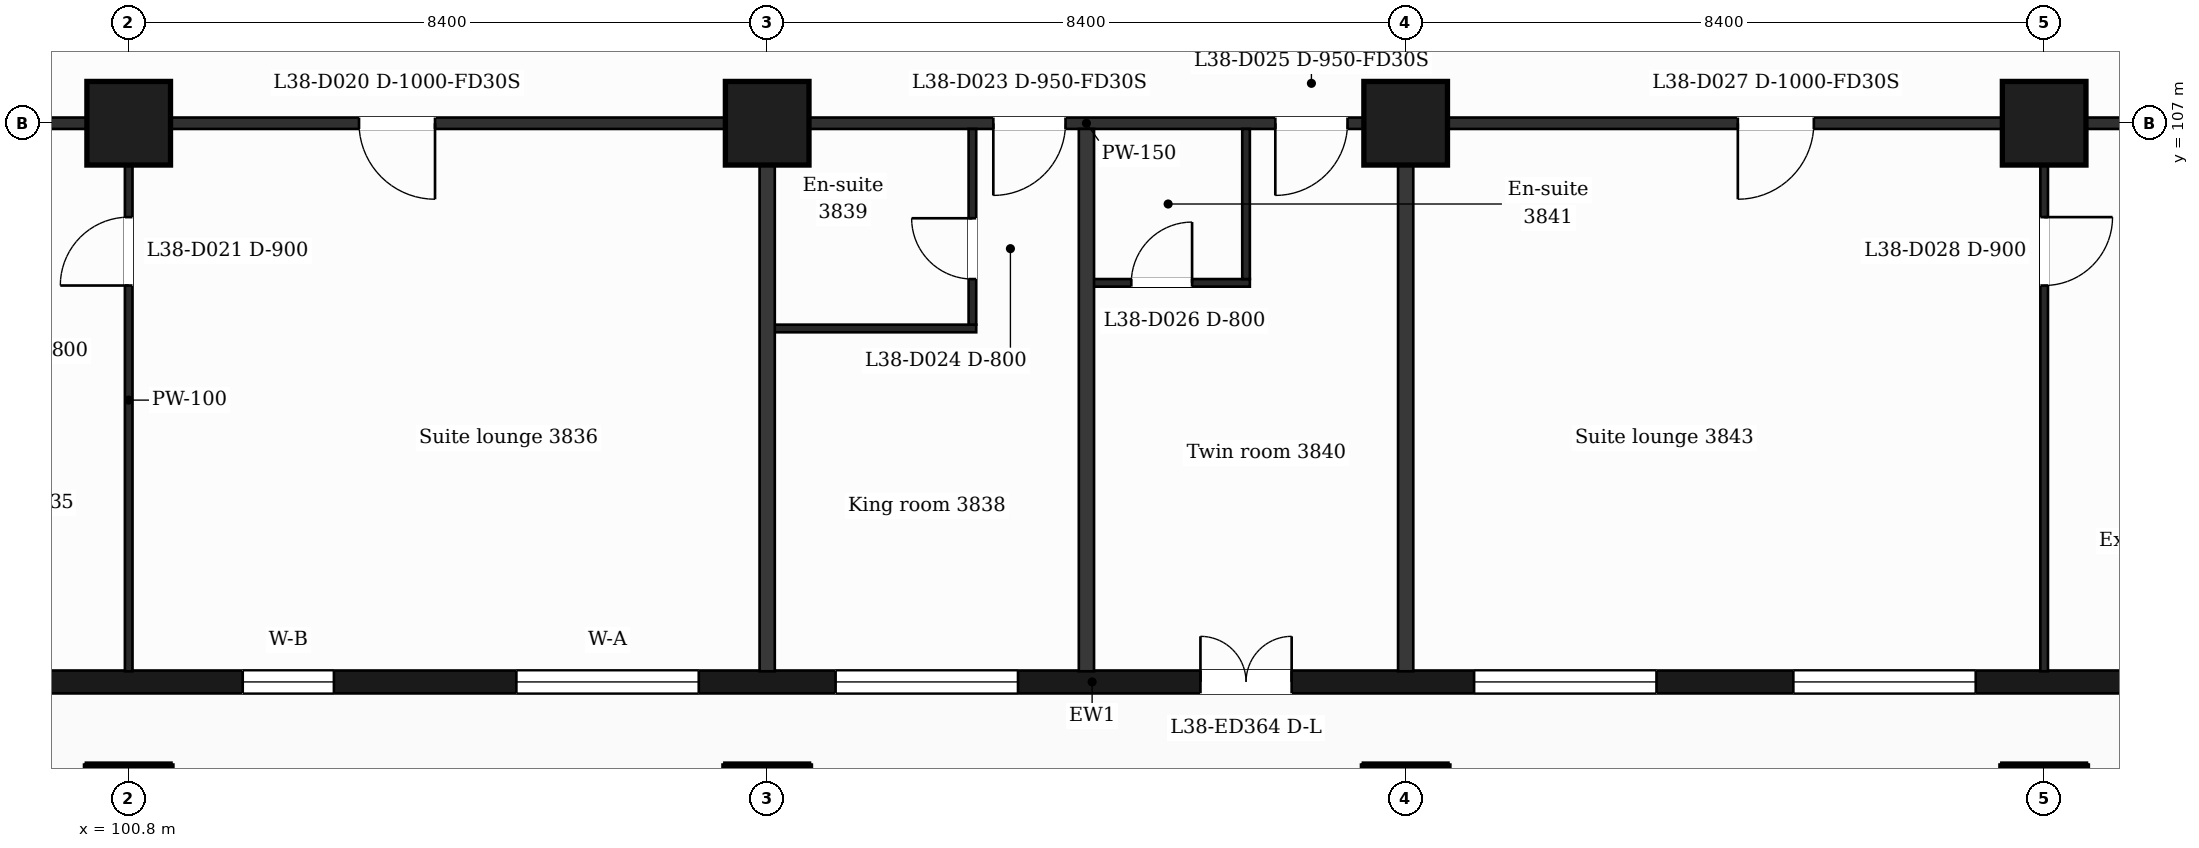
"""IFC4 building model, lengths in metres.
Left out: names, types, materials, properties, quantities, classifications, styles, units other than length and angle.
Written with IfcOpenShell. Run it as: python <this file> out.ifc"""

import sys

from ifc_helpers import new_model, si_unit, direction, frame, frame_2d, origin, origin_2d, place, context, subcontext, project, spatial, rectangle, extrude, element, fill, save


model = new_model("IFC4")
c1 = context("Model", 3, precision=1e-05, world=origin(), true_north=direction((0.0, 1.0)))
c2 = subcontext(c1, "Body", "Model", "MODEL_VIEW")
j1 = project(units=[si_unit("LENGTHUNIT", "METRE"), si_unit("PLANEANGLEUNIT", "RADIAN")], contexts=[c1])
p1 = place(None, origin())
s1 = spatial("IfcSite", under=j1, at=p1, CompositionType="ELEMENT")
p2 = place(p1, origin())
s2 = spatial("IfcBuilding", under=s1, at=p2, CompositionType="ELEMENT")
p3 = place(p2, frame((0.0, 0.0, 162.6)))
s3 = spatial("IfcBuildingStorey", under=s2, at=p3, CompositionType="ELEMENT", Elevation=162.6)
for number, where, z_axis, x_axis in (
    (1, (100.8, 98.0, 0.0), (0.0, 0.0, 1.0), (1.0, 0.0, 0.0)),
    (2, (109.2, 98.0, 0.0), (0.0, 0.0, 1.0), (1.0, 0.0, 0.0)),
    (3, (117.6, 98.0, 0.0), (0.0, 0.0, 1.0), (1.0, 0.0, 0.0)),
    (4, (126.0, 98.0, 0.0), (0.0, 0.0, 1.0), (1.0, 0.0, 0.0)),
    (5, (100.8, 107.0, 0.0), (0.0, 0.0, 1.0), (1.0, 0.0, 0.0)),
    (6, (109.2, 107.0, 0.0), (0.0, 0.0, 1.0), (1.0, 0.0, 0.0)),
    (7, (117.6, 107.0, 0.0), (0.0, 0.0, 1.0), (1.0, 0.0, 0.0)),
    (8, (126.0, 107.0, 0.0), (0.0, 0.0, 1.0), (1.0, 0.0, 0.0)),
):
    element("IfcColumn", number, at=place(p3, frame(where, z_axis=z_axis, x_axis=x_axis)), inside=s3, PredefinedType="COLUMN", context=c2, shape_type="SweptSolid", body=[
        extrude(rectangle(XDim=1.1, YDim=1.1, at=origin_2d()), origin(), (0.0, 0.0, 1.0), 3.7),
    ])
p4 = place(p3, frame((89.85, 99.65, 0.0), z_axis=(0.0, 0.0, 1.0), x_axis=(1.0, 0.0, 0.0)))
e9 = element("IfcWall", 9, at=p4, inside=s3, PredefinedType="SOLIDWALL", context=c2, shape_type="SweptSolid", body=[
    extrude(rectangle(XDim=47.25, YDim=0.3, at=frame_2d((23.625, 0.0))), origin(), (0.0, 0.0, 1.0), 3.38),
])
p5 = place(p4, frame((0.725, 0.0, 0.9)))
e10 = element("IfcOpeningElement", 10, at=p5, cuts=e9, PredefinedType="OPENING", context=c2, shape_type="SweptSolid", body=[
    extrude(rectangle(XDim=1.2, YDim=2.1, at=frame_2d((0.6, 1.05))), frame((0.0, 0.16, 0.0), z_axis=(0.0, -1.0, 0.0), x_axis=(1.0, 0.0, 0.0)), (0.0, 0.0, 1.0), 0.32),
])
p6 = place(p4, frame((3.45, 0.0, 0.9)))
e11 = element("IfcOpeningElement", 11, at=p6, cuts=e9, PredefinedType="OPENING", context=c2, shape_type="SweptSolid", body=[
    extrude(rectangle(XDim=2.4, YDim=2.1, at=frame_2d((1.2, 1.05))), frame((0.0, 0.16, 0.0), z_axis=(0.0, -1.0, 0.0), x_axis=(1.0, 0.0, 0.0)), (0.0, 0.0, 1.0), 0.32),
])
p7 = place(p4, frame((8.25, 0.0, 0.9)))
e12 = element("IfcOpeningElement", 12, at=p7, cuts=e9, PredefinedType="OPENING", context=c2, shape_type="SweptSolid", body=[
    extrude(rectangle(XDim=1.2, YDim=2.1, at=frame_2d((0.6, 1.05))), frame((0.0, 0.16, 0.0), z_axis=(0.0, -1.0, 0.0), x_axis=(1.0, 0.0, 0.0)), (0.0, 0.0, 1.0), 0.32),
])
p8 = place(p4, frame((12.45, 0.0, 0.9)))
e13 = element("IfcOpeningElement", 13, at=p8, cuts=e9, PredefinedType="OPENING", context=c2, shape_type="SweptSolid", body=[
    extrude(rectangle(XDim=1.2, YDim=2.1, at=frame_2d((0.6, 1.05))), frame((0.0, 0.16, 0.0), z_axis=(0.0, -1.0, 0.0), x_axis=(1.0, 0.0, 0.0)), (0.0, 0.0, 1.0), 0.32),
])
p9 = place(p4, frame((16.05, 0.0, 0.9)))
e14 = element("IfcOpeningElement", 14, at=p9, cuts=e9, PredefinedType="OPENING", context=c2, shape_type="SweptSolid", body=[
    extrude(rectangle(XDim=2.4, YDim=2.1, at=frame_2d((1.2, 1.05))), frame((0.0, 0.16, 0.0), z_axis=(0.0, -1.0, 0.0), x_axis=(1.0, 0.0, 0.0)), (0.0, 0.0, 1.0), 0.32),
])
p10 = place(p4, frame((20.25, 0.0, 0.9)))
e15 = element("IfcOpeningElement", 15, at=p10, cuts=e9, PredefinedType="OPENING", context=c2, shape_type="SweptSolid", body=[
    extrude(rectangle(XDim=2.4, YDim=2.1, at=frame_2d((1.2, 1.05))), frame((0.0, 0.16, 0.0), z_axis=(0.0, -1.0, 0.0), x_axis=(1.0, 0.0, 0.0)), (0.0, 0.0, 1.0), 0.32),
])
p11 = place(p4, frame((25.05, 0.0, 0.0)))
e16 = element("IfcOpeningElement", 16, at=p11, cuts=e9, PredefinedType="OPENING", context=c2, shape_type="SweptSolid", body=[
    extrude(rectangle(XDim=1.2, YDim=2.4, at=frame_2d((0.6, 1.2))), frame((0.0, 0.16, 0.0), z_axis=(0.0, -1.0, 0.0), x_axis=(1.0, 0.0, 0.0)), (0.0, 0.0, 1.0), 0.32),
])
p12 = place(p4, frame((28.65, 0.0, 0.9)))
e17 = element("IfcOpeningElement", 17, at=p12, cuts=e9, PredefinedType="OPENING", context=c2, shape_type="SweptSolid", body=[
    extrude(rectangle(XDim=2.4, YDim=2.1, at=frame_2d((1.2, 1.05))), frame((0.0, 0.16, 0.0), z_axis=(0.0, -1.0, 0.0), x_axis=(1.0, 0.0, 0.0)), (0.0, 0.0, 1.0), 0.32),
])
p13 = place(p4, frame((32.85, 0.0, 0.9)))
e18 = element("IfcOpeningElement", 18, at=p13, cuts=e9, PredefinedType="OPENING", context=c2, shape_type="SweptSolid", body=[
    extrude(rectangle(XDim=2.4, YDim=2.1, at=frame_2d((1.2, 1.05))), frame((0.0, 0.16, 0.0), z_axis=(0.0, -1.0, 0.0), x_axis=(1.0, 0.0, 0.0)), (0.0, 0.0, 1.0), 0.32),
])
p14 = place(p4, frame((37.65, 0.0, 0.9)))
e19 = element("IfcOpeningElement", 19, at=p14, cuts=e9, PredefinedType="OPENING", context=c2, shape_type="SweptSolid", body=[
    extrude(rectangle(XDim=1.2, YDim=2.1, at=frame_2d((0.6, 1.05))), frame((0.0, 0.16, 0.0), z_axis=(0.0, -1.0, 0.0), x_axis=(1.0, 0.0, 0.0)), (0.0, 0.0, 1.0), 0.32),
])
p15 = place(p4, frame((41.85, 0.0, 0.9)))
e20 = element("IfcOpeningElement", 20, at=p15, cuts=e9, PredefinedType="OPENING", context=c2, shape_type="SweptSolid", body=[
    extrude(rectangle(XDim=1.2, YDim=2.1, at=frame_2d((0.6, 1.05))), frame((0.0, 0.16, 0.0), z_axis=(0.0, -1.0, 0.0), x_axis=(1.0, 0.0, 0.0)), (0.0, 0.0, 1.0), 0.32),
])
p16 = place(p4, frame((45.25, 0.0, 0.9)))
e21 = element("IfcOpeningElement", 21, at=p16, cuts=e9, PredefinedType="OPENING", context=c2, shape_type="SweptSolid", body=[
    extrude(rectangle(XDim=1.2, YDim=2.1, at=frame_2d((0.6, 1.05))), frame((0.0, 0.16, 0.0), z_axis=(0.0, -1.0, 0.0), x_axis=(1.0, 0.0, 0.0)), (0.0, 0.0, 1.0), 0.32),
])
p17 = place(p3, frame((109.2, 104.3, 0.0), z_axis=(0.0, 0.0, 1.0), x_axis=(1.0, 0.0, 0.0)))
e22 = element("IfcWall", 22, at=p17, inside=s3, PredefinedType="PARTITIONING", context=c2, shape_type="SweptSolid", body=[
    extrude(rectangle(XDim=2.75, YDim=0.1, at=frame_2d((1.375, 0.0))), origin(), (0.0, 0.0, 1.0), 3.38),
])
p18 = place(p3, frame((113.4, 104.9, 0.0), z_axis=(0.0, 0.0, 1.0), x_axis=(1.0, 0.0, 0.0)))
e23 = element("IfcWall", 23, at=p18, inside=s3, PredefinedType="PARTITIONING", context=c2, shape_type="SweptSolid", body=[
    extrude(rectangle(XDim=2.15, YDim=0.1, at=frame_2d((1.075, 0.0))), origin(), (0.0, 0.0, 1.0), 3.38),
])
p19 = place(p18, frame((0.59, 0.0, 0.0)))
e24 = element("IfcOpeningElement", 24, at=p19, cuts=e23, PredefinedType="OPENING", context=c2, shape_type="SweptSolid", body=[
    extrude(rectangle(XDim=0.8, YDim=2.1, at=frame_2d((0.4, 1.05))), frame((0.0, 0.06, 0.0), z_axis=(0.0, -1.0, 0.0), x_axis=(1.0, 0.0, 0.0)), (0.0, 0.0, 1.0), 0.12),
])
p20 = place(p3, frame((87.018, 107.0, 0.0), z_axis=(0.0, 0.0, 1.0), x_axis=(1.0, 0.0, 0.0)))
e25 = element("IfcWall", 25, at=p20, inside=s3, PredefinedType="PARTITIONING", context=c2, shape_type="SweptSolid", body=[
    extrude(rectangle(XDim=52.765, YDim=0.15, at=frame_2d((26.382, 0.0))), origin(), (0.0, 0.0, 1.0), 3.38),
])
p21 = place(p20, frame((1.032, 0.0, 0.0)))
e26 = element("IfcOpeningElement", 26, at=p21, cuts=e25, PredefinedType="OPENING", context=c2, shape_type="SweptSolid", body=[
    extrude(rectangle(XDim=0.95, YDim=2.1, at=frame_2d((0.475, 1.05))), frame((0.0, 0.085, 0.0), z_axis=(0.0, -1.0, 0.0), x_axis=(1.0, 0.0, 0.0)), (0.0, 0.0, 1.0), 0.17),
])
p22 = place(p20, frame((6.369, 0.0, 0.0)))
e27 = element("IfcOpeningElement", 27, at=p22, cuts=e25, PredefinedType="OPENING", context=c2, shape_type="SweptSolid", body=[
    extrude(rectangle(XDim=0.95, YDim=2.1, at=frame_2d((0.475, 1.05))), frame((0.0, 0.085, 0.0), z_axis=(0.0, -1.0, 0.0), x_axis=(1.0, 0.0, 0.0)), (0.0, 0.0, 1.0), 0.17),
])
p23 = place(p20, frame((16.812, 0.0, 0.0)))
e28 = element("IfcOpeningElement", 28, at=p23, cuts=e25, PredefinedType="OPENING", context=c2, shape_type="SweptSolid", body=[
    extrude(rectangle(XDim=1.0, YDim=2.1, at=frame_2d((0.5, 1.05))), frame((0.0, 0.085, 0.0), z_axis=(0.0, -1.0, 0.0), x_axis=(1.0, 0.0, 0.0)), (0.0, 0.0, 1.0), 0.17),
])
p24 = place(p20, frame((25.157, 0.0, 0.0)))
e29 = element("IfcOpeningElement", 29, at=p24, cuts=e25, PredefinedType="OPENING", context=c2, shape_type="SweptSolid", body=[
    extrude(rectangle(XDim=0.95, YDim=2.1, at=frame_2d((0.475, 1.05))), frame((0.0, 0.085, 0.0), z_axis=(0.0, -1.0, 0.0), x_axis=(1.0, 0.0, 0.0)), (0.0, 0.0, 1.0), 0.17),
])
p25 = place(p20, frame((28.867, 0.0, 0.0)))
e30 = element("IfcOpeningElement", 30, at=p25, cuts=e25, PredefinedType="OPENING", context=c2, shape_type="SweptSolid", body=[
    extrude(rectangle(XDim=0.95, YDim=2.1, at=frame_2d((0.475, 1.05))), frame((0.0, 0.085, 0.0), z_axis=(0.0, -1.0, 0.0), x_axis=(1.0, 0.0, 0.0)), (0.0, 0.0, 1.0), 0.17),
])
p26 = place(p20, frame((34.952, 0.0, 0.0)))
e31 = element("IfcOpeningElement", 31, at=p26, cuts=e25, PredefinedType="OPENING", context=c2, shape_type="SweptSolid", body=[
    extrude(rectangle(XDim=1.0, YDim=2.1, at=frame_2d((0.5, 1.05))), frame((0.0, 0.085, 0.0), z_axis=(0.0, -1.0, 0.0), x_axis=(1.0, 0.0, 0.0)), (0.0, 0.0, 1.0), 0.17),
])
p27 = place(p20, frame((45.632, 0.0, 0.0)))
e32 = element("IfcOpeningElement", 32, at=p27, cuts=e25, PredefinedType="OPENING", context=c2, shape_type="SweptSolid", body=[
    extrude(rectangle(XDim=0.95, YDim=2.1, at=frame_2d((0.475, 1.05))), frame((0.0, 0.085, 0.0), z_axis=(0.0, -1.0, 0.0), x_axis=(1.0, 0.0, 0.0)), (0.0, 0.0, 1.0), 0.17),
])
p28 = place(p20, frame((48.56, 0.0, 0.0)))
e33 = element("IfcOpeningElement", 33, at=p28, cuts=e25, PredefinedType="OPENING", context=c2, shape_type="SweptSolid", body=[
    extrude(rectangle(XDim=0.95, YDim=2.1, at=frame_2d((0.475, 1.05))), frame((0.0, 0.085, 0.0), z_axis=(0.0, -1.0, 0.0), x_axis=(1.0, 0.0, 0.0)), (0.0, 0.0, 1.0), 0.17),
])
p29 = place(p3, frame((100.8, 99.79, 0.0), z_axis=(0.0, 0.0, 1.0), x_axis=(0.0, 1.0, 0.0)))
e34 = element("IfcWall", 34, at=p29, inside=s3, PredefinedType="PARTITIONING", context=c2, shape_type="SweptSolid", body=[
    extrude(rectangle(XDim=7.135, YDim=0.1, at=frame_2d((3.567, 0.0))), origin(), (0.0, 0.0, 1.0), 3.38),
])
p30 = place(p29, frame((5.075, 0.0, 0.0)))
e35 = element("IfcOpeningElement", 35, at=p30, cuts=e34, PredefinedType="OPENING", context=c2, shape_type="SweptSolid", body=[
    extrude(rectangle(XDim=0.9, YDim=2.1, at=frame_2d((0.45, 1.05))), frame((0.0, 0.06, 0.0), z_axis=(0.0, -1.0, 0.0), x_axis=(1.0, 0.0, 0.0)), (0.0, 0.0, 1.0), 0.12),
])
p31 = place(p3, frame((109.2, 99.79, 0.0), z_axis=(0.0, 0.0, 1.0), x_axis=(0.0, 1.0, 0.0)))
e36 = element("IfcWall", 36, at=p31, inside=s3, PredefinedType="PARTITIONING", context=c2, shape_type="SweptSolid", body=[
    extrude(rectangle(XDim=7.135, YDim=0.2, at=frame_2d((3.567, 0.0))), origin(), (0.0, 0.0, 1.0), 3.38),
])
p32 = place(p3, frame((111.9, 104.35, 0.0), z_axis=(0.0, 0.0, 1.0), x_axis=(0.0, 1.0, 0.0)))
e37 = element("IfcWall", 37, at=p32, inside=s3, PredefinedType="PARTITIONING", context=c2, shape_type="SweptSolid", body=[
    extrude(rectangle(XDim=2.575, YDim=0.1, at=frame_2d((1.288, 0.0))), origin(), (0.0, 0.0, 1.0), 3.38),
])
p33 = place(p32, frame((0.6, 0.0, 0.0)))
e38 = element("IfcOpeningElement", 38, at=p33, cuts=e37, PredefinedType="OPENING", context=c2, shape_type="SweptSolid", body=[
    extrude(rectangle(XDim=0.8, YDim=2.1, at=frame_2d((0.4, 1.05))), frame((0.0, 0.06, 0.0), z_axis=(0.0, -1.0, 0.0), x_axis=(1.0, 0.0, 0.0)), (0.0, 0.0, 1.0), 0.12),
])
p34 = place(p3, frame((113.4, 99.79, 0.0), z_axis=(0.0, 0.0, 1.0), x_axis=(0.0, 1.0, 0.0)))
e39 = element("IfcWall", 39, at=p34, inside=s3, PredefinedType="PARTITIONING", context=c2, shape_type="SweptSolid", body=[
    extrude(rectangle(XDim=7.135, YDim=0.2, at=frame_2d((3.567, 0.0))), origin(), (0.0, 0.0, 1.0), 3.38),
])
p35 = place(p3, frame((115.5, 104.95, 0.0), z_axis=(0.0, 0.0, 1.0), x_axis=(0.0, 1.0, 0.0)))
e40 = element("IfcWall", 40, at=p35, inside=s3, PredefinedType="PARTITIONING", context=c2, shape_type="SweptSolid", body=[
    extrude(rectangle(XDim=1.975, YDim=0.1, at=frame_2d((0.988, 0.0))), origin(), (0.0, 0.0, 1.0), 3.38),
])
p36 = place(p3, frame((117.6, 99.79, 0.0), z_axis=(0.0, 0.0, 1.0), x_axis=(0.0, 1.0, 0.0)))
e41 = element("IfcWall", 41, at=p36, inside=s3, PredefinedType="PARTITIONING", context=c2, shape_type="SweptSolid", body=[
    extrude(rectangle(XDim=7.135, YDim=0.2, at=frame_2d((3.567, 0.0))), origin(), (0.0, 0.0, 1.0), 3.38),
])
p37 = place(p3, frame((126.0, 99.79, 0.0), z_axis=(0.0, 0.0, 1.0), x_axis=(0.0, 1.0, 0.0)))
e42 = element("IfcWall", 42, at=p37, inside=s3, PredefinedType="PARTITIONING", context=c2, shape_type="SweptSolid", body=[
    extrude(rectangle(XDim=7.135, YDim=0.1, at=frame_2d((3.567, 0.0))), origin(), (0.0, 0.0, 1.0), 3.38),
])
p38 = place(p37, frame((5.075, 0.0, 0.0)))
e43 = element("IfcOpeningElement", 43, at=p38, cuts=e42, PredefinedType="OPENING", context=c2, shape_type="SweptSolid", body=[
    extrude(rectangle(XDim=0.9, YDim=2.1, at=frame_2d((0.45, 1.05))), frame((0.0, 0.06, 0.0), z_axis=(0.0, -1.0, 0.0), x_axis=(1.0, 0.0, 0.0)), (0.0, 0.0, 1.0), 0.12),
])
p39 = place(p8, origin())
e44 = element("IfcWindow", 44, at=p39, inside=s3, PartitioningType="SINGLE_PANEL", PredefinedType="WINDOW", context=c2, shape_type="SweptSolid", body=[
    extrude(rectangle(XDim=1.2, YDim=2.1, at=frame_2d((0.6, 1.05))), frame((0.0, 0.03, 0.0), z_axis=(0.0, -1.0, 0.0), x_axis=(1.0, 0.0, 0.0)), (0.0, 0.0, 1.0), 0.06),
])
fill(e13, e44)
p40 = place(p9, origin())
e45 = element("IfcWindow", 45, at=p40, inside=s3, PartitioningType="SINGLE_PANEL", PredefinedType="WINDOW", context=c2, shape_type="SweptSolid", body=[
    extrude(rectangle(XDim=2.4, YDim=2.1, at=frame_2d((1.2, 1.05))), frame((0.0, 0.03, 0.0), z_axis=(0.0, -1.0, 0.0), x_axis=(1.0, 0.0, 0.0)), (0.0, 0.0, 1.0), 0.06),
])
fill(e14, e45)
p41 = place(p10, origin())
e46 = element("IfcWindow", 46, at=p41, inside=s3, PartitioningType="SINGLE_PANEL", PredefinedType="WINDOW", context=c2, shape_type="SweptSolid", body=[
    extrude(rectangle(XDim=2.4, YDim=2.1, at=frame_2d((1.2, 1.05))), frame((0.0, 0.03, 0.0), z_axis=(0.0, -1.0, 0.0), x_axis=(1.0, 0.0, 0.0)), (0.0, 0.0, 1.0), 0.06),
])
fill(e15, e46)
p42 = place(p11, origin())
e47 = element("IfcDoor", 47, at=p42, inside=s3, OperationType="DOUBLE_DOOR_SINGLE_SWING", PredefinedType="DOOR", context=c2, shape_type="SweptSolid", body=[
    extrude(rectangle(XDim=1.2, YDim=2.4, at=frame_2d((0.6, 1.2))), frame((0.0, 0.025, 0.0), z_axis=(0.0, -1.0, 0.0), x_axis=(1.0, 0.0, 0.0)), (0.0, 0.0, 1.0), 0.05),
])
fill(e16, e47)
p43 = place(p12, origin())
e48 = element("IfcWindow", 48, at=p43, inside=s3, PartitioningType="SINGLE_PANEL", PredefinedType="WINDOW", context=c2, shape_type="SweptSolid", body=[
    extrude(rectangle(XDim=2.4, YDim=2.1, at=frame_2d((1.2, 1.05))), frame((0.0, 0.03, 0.0), z_axis=(0.0, -1.0, 0.0), x_axis=(1.0, 0.0, 0.0)), (0.0, 0.0, 1.0), 0.06),
])
fill(e17, e48)
p44 = place(p13, origin())
e49 = element("IfcWindow", 49, at=p44, inside=s3, PartitioningType="SINGLE_PANEL", PredefinedType="WINDOW", context=c2, shape_type="SweptSolid", body=[
    extrude(rectangle(XDim=2.4, YDim=2.1, at=frame_2d((1.2, 1.05))), frame((0.0, 0.03, 0.0), z_axis=(0.0, -1.0, 0.0), x_axis=(1.0, 0.0, 0.0)), (0.0, 0.0, 1.0), 0.06),
])
fill(e18, e49)
p45 = place(p23, origin())
e50 = element("IfcDoor", 50, at=p45, inside=s3, OperationType="SINGLE_SWING_RIGHT", PredefinedType="DOOR", context=c2, shape_type="SweptSolid", body=[
    extrude(rectangle(XDim=1.0, YDim=2.1, at=frame_2d((0.5, 1.05))), frame((0.0, 0.025, 0.0), z_axis=(0.0, -1.0, 0.0), x_axis=(1.0, 0.0, 0.0)), (0.0, 0.0, 1.0), 0.05),
])
fill(e28, e50)
p46 = place(p30, origin())
e51 = element("IfcDoor", 51, at=p46, inside=s3, OperationType="SINGLE_SWING_LEFT", PredefinedType="DOOR", context=c2, shape_type="SweptSolid", body=[
    extrude(rectangle(XDim=0.9, YDim=2.1, at=frame_2d((0.45, 1.05))), frame((0.0, 0.025, 0.0), z_axis=(0.0, -1.0, 0.0), x_axis=(1.0, 0.0, 0.0)), (0.0, 0.0, 1.0), 0.05),
])
fill(e35, e51)
p47 = place(p24, origin())
e52 = element("IfcDoor", 52, at=p47, inside=s3, OperationType="SINGLE_SWING_LEFT", PredefinedType="DOOR", context=c2, shape_type="SweptSolid", body=[
    extrude(rectangle(XDim=0.95, YDim=2.1, at=frame_2d((0.475, 1.05))), frame((0.0, 0.025, 0.0), z_axis=(0.0, -1.0, 0.0), x_axis=(1.0, 0.0, 0.0)), (0.0, 0.0, 1.0), 0.05),
])
fill(e29, e52)
p48 = place(p33, origin())
e53 = element("IfcDoor", 53, at=p48, inside=s3, OperationType="SINGLE_SWING_RIGHT", PredefinedType="DOOR", context=c2, shape_type="SweptSolid", body=[
    extrude(rectangle(XDim=0.8, YDim=2.1, at=frame_2d((0.4, 1.05))), frame((0.0, 0.025, 0.0), z_axis=(0.0, -1.0, 0.0), x_axis=(1.0, 0.0, 0.0)), (0.0, 0.0, 1.0), 0.05),
])
fill(e38, e53)
p49 = place(p25, origin())
e54 = element("IfcDoor", 54, at=p49, inside=s3, OperationType="SINGLE_SWING_LEFT", PredefinedType="DOOR", context=c2, shape_type="SweptSolid", body=[
    extrude(rectangle(XDim=0.95, YDim=2.1, at=frame_2d((0.475, 1.05))), frame((0.0, 0.025, 0.0), z_axis=(0.0, -1.0, 0.0), x_axis=(1.0, 0.0, 0.0)), (0.0, 0.0, 1.0), 0.05),
])
fill(e30, e54)
p50 = place(p19, origin())
e55 = element("IfcDoor", 55, at=p50, inside=s3, OperationType="SINGLE_SWING_RIGHT", PredefinedType="DOOR", context=c2, shape_type="SweptSolid", body=[
    extrude(rectangle(XDim=0.8, YDim=2.1, at=frame_2d((0.4, 1.05))), frame((0.0, 0.025, 0.0), z_axis=(0.0, -1.0, 0.0), x_axis=(1.0, 0.0, 0.0)), (0.0, 0.0, 1.0), 0.05),
])
fill(e24, e55)
p51 = place(p26, origin())
e56 = element("IfcDoor", 56, at=p51, inside=s3, OperationType="SINGLE_SWING_LEFT", PredefinedType="DOOR", context=c2, shape_type="SweptSolid", body=[
    extrude(rectangle(XDim=1.0, YDim=2.1, at=frame_2d((0.5, 1.05))), frame((0.0, 0.025, 0.0), z_axis=(0.0, -1.0, 0.0), x_axis=(1.0, 0.0, 0.0)), (0.0, 0.0, 1.0), 0.05),
])
fill(e31, e56)
p52 = place(p38, origin())
e57 = element("IfcDoor", 57, at=p52, inside=s3, OperationType="SINGLE_SWING_RIGHT", PredefinedType="DOOR", context=c2, shape_type="SweptSolid", body=[
    extrude(rectangle(XDim=0.9, YDim=2.1, at=frame_2d((0.45, 1.05))), frame((0.0, 0.025, 0.0), z_axis=(0.0, -1.0, 0.0), x_axis=(1.0, 0.0, 0.0)), (0.0, 0.0, 1.0), 0.05),
])
fill(e43, e57)
save(model, sys.argv[1])
